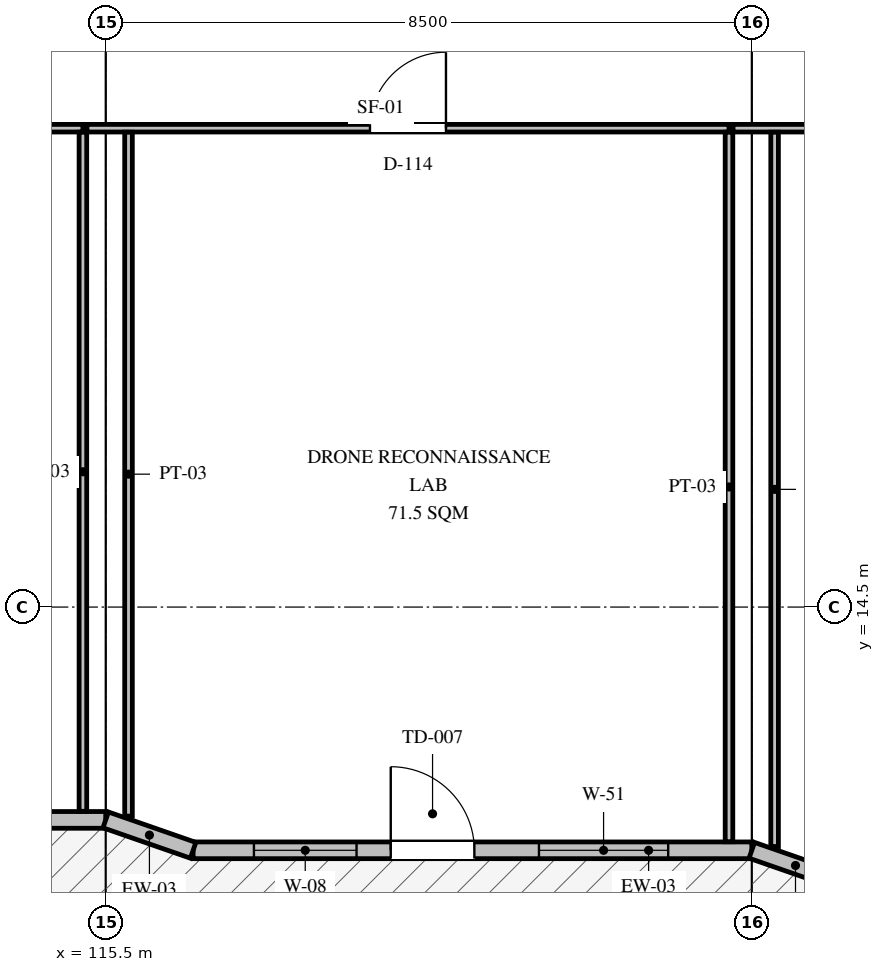
"""IFC4 building model, lengths in metres.
Left out: names, types, materials, properties, quantities, classifications, styles, units other than length and angle.
Written with IfcOpenShell. Run it as: python <this file> out.ifc"""

import sys

from ifc_helpers import new_model, si_unit, direction, frame, frame_2d, origin, place, context, subcontext, project, spatial, polyline, rectangle, outline, extrude, element, fill, save


model = new_model("IFC4")
c1 = context("Model", 3, precision=1e-05, world=origin(), true_north=direction((0.0, 1.0)))
c2 = subcontext(c1, "Body", "Model", "MODEL_VIEW")
j1 = project(units=[si_unit("LENGTHUNIT", "METRE"), si_unit("PLANEANGLEUNIT", "RADIAN")], contexts=[c1])
p1 = place(None, origin())
s1 = spatial("IfcSite", under=j1, at=p1, CompositionType="ELEMENT")
p2 = place(p1, origin())
s2 = spatial("IfcBuilding", under=s1, at=p2, CompositionType="ELEMENT")
p3 = place(p2, frame((0.0, 0.0, 5.85)))
s3 = spatial("IfcBuildingStorey", under=s2, at=p3, CompositionType="ELEMENT", Elevation=5.85)
p4 = place(p3, frame((108.15, 11.7, 0.0), z_axis=(0.0, 0.0, 1.0), x_axis=(1.0, 0.0, 0.0)))
e1 = element("IfcWall", 1, at=p4, inside=s3, PredefinedType="SOLIDWALL", context=c2, shape_type="SweptSolid", body=[
    extrude(outline(polyline([(0.0, 0.0), (7.35, 0.0), (7.35, 3.95), (2.42, 12.02), (0.0, 3.95), (0.0, 0.0)])), frame((0.0, 0.11, 0.0), z_axis=(0.0, -1.0, 0.0), x_axis=(1.0, 0.0, 0.0)), (0.0, 0.0, 1.0), 0.22),
])
p5 = place(p4, frame((2.6, 0.0, 0.0)))
e2 = element("IfcOpeningElement", 2, at=p5, cuts=e1, PredefinedType="OPENING", context=c2, shape_type="SweptSolid", body=[
    extrude(rectangle(XDim=1.05, YDim=2.15, at=frame_2d((0.525, 1.075))), frame((0.0, 0.12, 0.0), z_axis=(0.0, -1.0, 0.0), x_axis=(1.0, 0.0, 0.0)), (0.0, 0.0, 1.0), 0.24),
])
p6 = place(p4, frame((0.85, 0.0, 1.1)))
e3 = element("IfcOpeningElement", 3, at=p6, cuts=e1, PredefinedType="OPENING", context=c2, shape_type="SweptSolid", body=[
    extrude(rectangle(XDim=1.25, YDim=1.25, at=frame_2d((0.625, 0.625))), frame((0.0, 0.12, 0.0), z_axis=(0.0, -1.0, 0.0), x_axis=(1.0, 0.0, 0.0)), (0.0, 0.0, 1.0), 0.24),
])
p7 = place(p4, frame((4.65, 0.0, 1.55)))
e4 = element("IfcOpeningElement", 4, at=p7, cuts=e1, PredefinedType="OPENING", context=c2, shape_type="SweptSolid", body=[
    extrude(rectangle(XDim=1.55, YDim=1.65, at=frame_2d((0.775, 0.825))), frame((0.0, 0.12, 0.0), z_axis=(0.0, -1.0, 0.0), x_axis=(1.0, 0.0, 0.0)), (0.0, 0.0, 1.0), 0.24),
])
p8 = place(p3, frame((116.65, 11.3, 0.0), z_axis=(0.0, 0.0, 1.0), x_axis=(1.0, 0.0, 0.0)))
e5 = element("IfcWall", 5, at=p8, inside=s3, PredefinedType="SOLIDWALL", context=c2, shape_type="SweptSolid", body=[
    extrude(rectangle(XDim=7.35, YDim=0.22, at=frame_2d((3.675, 0.0))), origin(), (0.0, 0.0, 1.0), 4.0),
])
p9 = place(p8, frame((2.6, 0.0, 0.0)))
e6 = element("IfcOpeningElement", 6, at=p9, cuts=e5, PredefinedType="OPENING", context=c2, shape_type="SweptSolid", body=[
    extrude(rectangle(XDim=1.1, YDim=2.2, at=frame_2d((0.55, 1.1))), frame((0.0, 0.12, 0.0), z_axis=(0.0, -1.0, 0.0), x_axis=(1.0, 0.0, 0.0)), (0.0, 0.0, 1.0), 0.24),
])
p10 = place(p8, frame((0.8, 0.0, 1.1)))
e7 = element("IfcOpeningElement", 7, at=p10, cuts=e5, PredefinedType="OPENING", context=c2, shape_type="SweptSolid", body=[
    extrude(rectangle(XDim=1.35, YDim=1.35, at=frame_2d((0.675, 0.675))), frame((0.0, 0.12, 0.0), z_axis=(0.0, -1.0, 0.0), x_axis=(1.0, 0.0, 0.0)), (0.0, 0.0, 1.0), 0.24),
])
p11 = place(p8, frame((4.55, 0.0, 1.35)))
e8 = element("IfcOpeningElement", 8, at=p11, cuts=e5, PredefinedType="OPENING", context=c2, shape_type="SweptSolid", body=[
    extrude(rectangle(XDim=1.7, YDim=1.65, at=frame_2d((0.85, 0.825))), frame((0.0, 0.12, 0.0), z_axis=(0.0, -1.0, 0.0), x_axis=(1.0, 0.0, 0.0)), (0.0, 0.0, 1.0), 0.24),
])
for number, where, z_axis, x_axis in (
    (9, (115.5, 11.7, 0.0), (0.0, 0.0, 1.0), (0.945, -0.328, 0.0)),
    (10, (124.0, 11.3, 0.0), (0.0, 0.0, 1.0), (0.944, -0.329, 0.0)),
):
    element("IfcWall", number, at=place(p3, frame(where, z_axis=z_axis, x_axis=x_axis)), inside=s3, PredefinedType="SOLIDWALL", context=c2, shape_type="SweptSolid", body=[
        extrude(outline(polyline([(0.0, 0.0), (1.218, 0.0), (1.218, 3.95), (0.0, 3.95), (0.0, 0.0)])), frame((0.0, 0.11, 0.0), z_axis=(0.0, -1.0, 0.0), x_axis=(1.0, 0.0, 0.0)), (0.0, 0.0, 1.0), 0.22),
    ])
p12 = place(p3, frame((106.753, 20.8, 0.0), z_axis=(0.0, 0.0, 1.0), x_axis=(1.0, 0.0, 0.0)))
e11 = element("IfcWall", 11, at=p12, inside=s3, PredefinedType="PARTITIONING", context=c2, shape_type="SweptSolid", body=[
    extrude(rectangle(XDim=8.447, YDim=0.1, at=frame_2d((4.224, 0.0))), origin(), (0.0, 0.0, 1.0), 3.544),
])
p13 = place(p12, frame((3.723, 0.0, 0.0)))
e12 = element("IfcOpeningElement", 12, at=p13, cuts=e11, PredefinedType="OPENING", context=c2, shape_type="SweptSolid", body=[
    extrude(rectangle(XDim=1.0, YDim=2.1, at=frame_2d((0.5, 1.05))), frame((0.0, 0.06, 0.0), z_axis=(0.0, -1.0, 0.0), x_axis=(1.0, 0.0, 0.0)), (0.0, 0.0, 1.0), 0.12),
])
p14 = place(p3, frame((115.2, 11.813, 0.0), z_axis=(0.0, 0.0, 1.0), x_axis=(0.0, 1.0, 0.0)))
e13 = element("IfcWall", 13, at=p14, inside=s3, PredefinedType="PARTITIONING", context=c2, shape_type="SweptSolid", body=[
    extrude(rectangle(XDim=8.934, YDim=0.1, at=frame_2d((4.467, 0.0))), origin(), (0.0, 0.0, 1.0), 3.594),
])
p15 = place(p3, frame((115.253, 20.8, 0.0), z_axis=(0.0, 0.0, 1.0), x_axis=(1.0, 0.0, 0.0)))
e14 = element("IfcWall", 14, at=p15, inside=s3, PredefinedType="PARTITIONING", context=c2, shape_type="SweptSolid", body=[
    extrude(rectangle(XDim=8.447, YDim=0.1, at=frame_2d((4.224, 0.0))), origin(), (0.0, 0.0, 1.0), 3.544),
])
p16 = place(p15, frame((3.723, 0.0, 0.0)))
e15 = element("IfcOpeningElement", 15, at=p16, cuts=e14, PredefinedType="OPENING", context=c2, shape_type="SweptSolid", body=[
    extrude(rectangle(XDim=1.0, YDim=2.1, at=frame_2d((0.5, 1.05))), frame((0.0, 0.06, 0.0), z_axis=(0.0, -1.0, 0.0), x_axis=(1.0, 0.0, 0.0)), (0.0, 0.0, 1.0), 0.12),
])
p17 = place(p3, frame((115.8, 11.75, 0.0), z_axis=(0.0, 0.0, 1.0), x_axis=(0.0, 1.0, 0.0)))
e16 = element("IfcWall", 16, at=p17, inside=s3, PredefinedType="PARTITIONING", context=c2, shape_type="SweptSolid", body=[
    extrude(rectangle(XDim=8.997, YDim=0.1, at=frame_2d((4.499, 0.0))), origin(), (0.0, 0.0, 1.0), 3.594),
])
p18 = place(p3, frame((123.7, 11.413, 0.0), z_axis=(0.0, 0.0, 1.0), x_axis=(0.0, 1.0, 0.0)))
e17 = element("IfcWall", 17, at=p18, inside=s3, PredefinedType="PARTITIONING", context=c2, shape_type="SweptSolid", body=[
    extrude(rectangle(XDim=9.334, YDim=0.1, at=frame_2d((4.667, 0.0))), origin(), (0.0, 0.0, 1.0), 3.594),
])
p19 = place(p3, frame((123.753, 20.8, 0.0), z_axis=(0.0, 0.0, 1.0), x_axis=(1.0, 0.0, 0.0)))
e18 = element("IfcWall", 18, at=p19, inside=s3, PredefinedType="PARTITIONING", context=c2, shape_type="SweptSolid", body=[
    extrude(rectangle(XDim=7.947, YDim=0.1, at=frame_2d((3.974, 0.0))), origin(), (0.0, 0.0, 1.0), 3.544),
])
p20 = place(p19, frame((3.473, 0.0, 0.0)))
e19 = element("IfcOpeningElement", 19, at=p20, cuts=e18, PredefinedType="OPENING", context=c2, shape_type="SweptSolid", body=[
    extrude(rectangle(XDim=1.0, YDim=2.1, at=frame_2d((0.5, 1.05))), frame((0.0, 0.06, 0.0), z_axis=(0.0, -1.0, 0.0), x_axis=(1.0, 0.0, 0.0)), (0.0, 0.0, 1.0), 0.12),
])
p21 = place(p3, frame((124.3, 11.35, 0.0), z_axis=(0.0, 0.0, 1.0), x_axis=(0.0, 1.0, 0.0)))
e20 = element("IfcWall", 20, at=p21, inside=s3, PredefinedType="PARTITIONING", context=c2, shape_type="SweptSolid", body=[
    extrude(rectangle(XDim=9.397, YDim=0.1, at=frame_2d((4.698, 0.0))), origin(), (0.0, 0.0, 1.0), 3.594),
])
p22 = place(p9, frame((1.1, 0.0, 0.0), z_axis=(0.0, 0.0, 1.0), x_axis=(-1.0, 0.0, 0.0)))
e21 = element("IfcDoor", 21, at=p22, inside=s3, OperationType="SINGLE_SWING_LEFT", PredefinedType="DOOR", context=c2, shape_type="SweptSolid", body=[
    extrude(rectangle(XDim=1.1, YDim=2.2, at=frame_2d((0.55, 1.1))), frame((0.0, 0.025, 0.0), z_axis=(0.0, -1.0, 0.0), x_axis=(1.0, 0.0, 0.0)), (0.0, 0.0, 1.0), 0.05),
])
fill(e6, e21)
p23 = place(p10, origin())
e22 = element("IfcWindow", 22, at=p23, inside=s3, PartitioningType="SINGLE_PANEL", PredefinedType="WINDOW", context=c2, shape_type="SweptSolid", body=[
    extrude(rectangle(XDim=1.35, YDim=1.35, at=frame_2d((0.675, 0.675))), frame((0.0, 0.03, 0.0), z_axis=(0.0, -1.0, 0.0), x_axis=(1.0, 0.0, 0.0)), (0.0, 0.0, 1.0), 0.06),
])
fill(e7, e22)
p24 = place(p11, origin())
e23 = element("IfcWindow", 23, at=p24, inside=s3, PartitioningType="SINGLE_PANEL", PredefinedType="WINDOW", context=c2, shape_type="SweptSolid", body=[
    extrude(rectangle(XDim=1.7, YDim=1.65, at=frame_2d((0.85, 0.825))), frame((0.0, 0.03, 0.0), z_axis=(0.0, -1.0, 0.0), x_axis=(1.0, 0.0, 0.0)), (0.0, 0.0, 1.0), 0.06),
])
fill(e8, e23)
p25 = place(p16, origin())
e24 = element("IfcDoor", 24, at=p25, inside=s3, OperationType="SINGLE_SWING_RIGHT", PredefinedType="DOOR", context=c2, shape_type="SweptSolid", body=[
    extrude(rectangle(XDim=1.0, YDim=2.1, at=frame_2d((0.5, 1.05))), frame((0.0, 0.025, 0.0), z_axis=(0.0, -1.0, 0.0), x_axis=(1.0, 0.0, 0.0)), (0.0, 0.0, 1.0), 0.05),
])
fill(e15, e24)
save(model, sys.argv[1])
